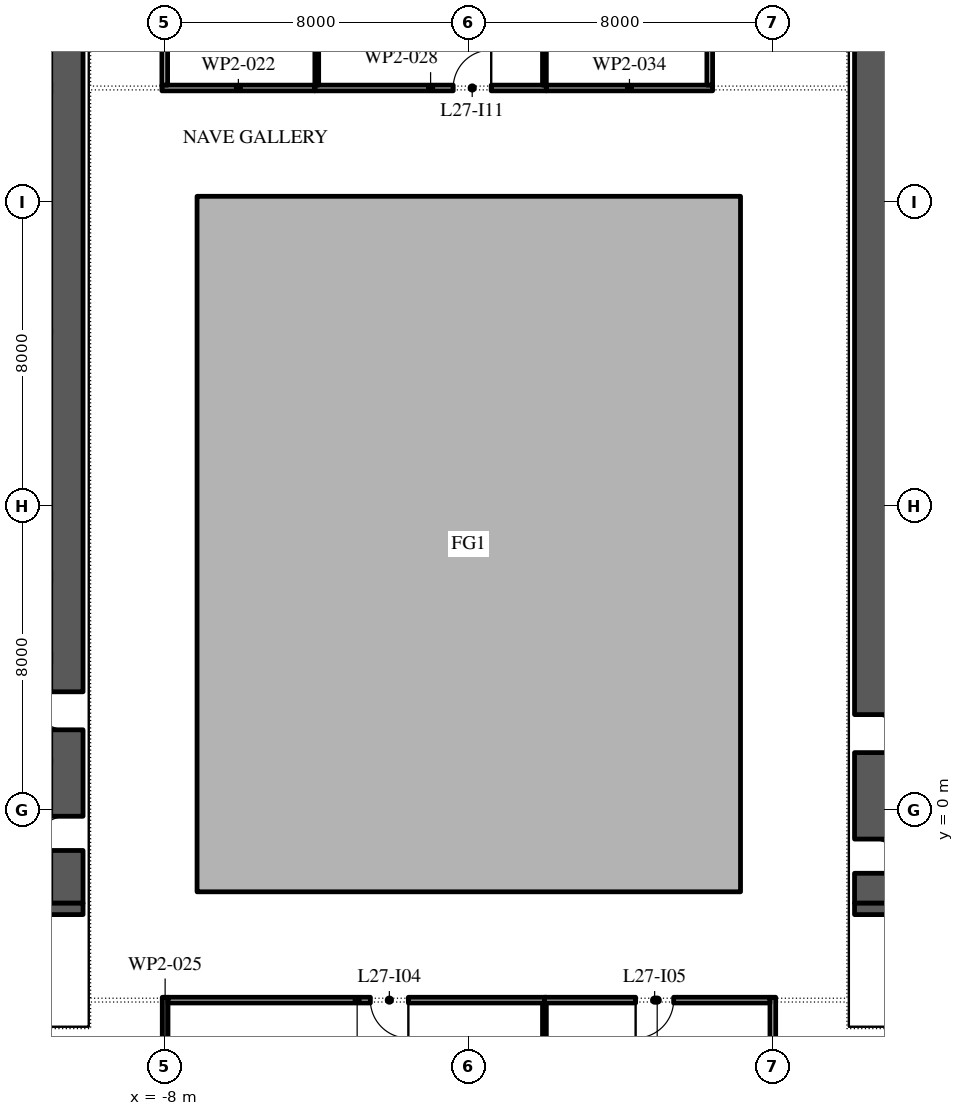
"""IFC4 building model, lengths in metres.
Left out: names, types, materials, properties, quantities, classifications, styles, units other than length and angle.
Written with IfcOpenShell. Run it as: python <this file> out.ifc"""

import sys

from ifc_helpers import new_model, si_unit, direction, frame, frame_2d, origin, place, context, subcontext, project, spatial, polyline, rectangle, outline, extrude, element, fill, save


model = new_model("IFC4")
c1 = context("Model", 3, precision=1e-05, world=origin(), true_north=direction((0.0, 1.0)))
c2 = subcontext(c1, "Body", "Model", "MODEL_VIEW")
j1 = project(units=[si_unit("LENGTHUNIT", "METRE"), si_unit("PLANEANGLEUNIT", "RADIAN")], contexts=[c1])
p1 = place(None, origin())
s1 = spatial("IfcSite", under=j1, at=p1, CompositionType="ELEMENT")
p2 = place(p1, origin())
s2 = spatial("IfcBuilding", under=s1, at=p2, CompositionType="ELEMENT")
p3 = place(p2, frame((0.0, 0.0, 126.6)))
s3 = spatial("IfcBuildingStorey", under=s2, at=p3, CompositionType="ELEMENT", Elevation=126.6)
p4 = place(p3, origin())
e1 = element("IfcWall", 1, at=p4, inside=s3, PredefinedType="STANDARD", context=c2, shape_type="SweptSolid", body=[
    extrude(outline(polyline([(-7.15, -2.15), (7.15, -2.15), (7.15, 16.15), (-7.15, 16.15), (-7.15, -2.15)]), holes=[polyline([(-7.0, -2.0), (-7.0, 16.0), (7.0, 16.0), (7.0, -2.0), (-7.0, -2.0)])]), origin(), (0.0, 0.0, 1.0), 4.0),
])
p5 = place(p3, frame((-10.575, -2.45, 0.0), z_axis=(0.0, 0.0, 1.0), x_axis=(0.0, 1.0, 0.0)))
e2 = element("IfcWall", 2, at=p5, inside=s3, PredefinedType="SHEAR", context=c2, shape_type="SweptSolid", body=[
    extrude(rectangle(XDim=27.9, YDim=0.85, at=frame_2d((13.95, 0.0))), origin(), (0.0, 0.0, 1.0), 4.0),
])
p6 = place(p5, frame((23.65, 0.0, 0.0)))
e3 = element("IfcOpeningElement", 3, at=p6, cuts=e2, PredefinedType="OPENING", context=c2, shape_type="SweptSolid", body=[
    extrude(rectangle(XDim=2.4, YDim=2.1, at=frame_2d((1.2, 1.05))), frame((0.0, 0.435, 0.0), z_axis=(0.0, -1.0, 0.0), x_axis=(1.0, 0.0, 0.0)), (0.0, 0.0, 1.0), 0.87),
])
p7 = place(p5, frame((1.387, 0.0, 0.0)))
e4 = element("IfcOpeningElement", 4, at=p7, cuts=e2, PredefinedType="OPENING", context=c2, shape_type="SweptSolid", body=[
    extrude(rectangle(XDim=0.9, YDim=2.1, at=frame_2d((0.45, 1.05))), frame((0.0, 0.435, 0.0), z_axis=(0.0, -1.0, 0.0), x_axis=(1.0, 0.0, 0.0)), (0.0, 0.0, 1.0), 0.87),
])
p8 = place(p5, frame((4.562, 0.0, 0.0)))
e5 = element("IfcOpeningElement", 5, at=p8, cuts=e2, PredefinedType="OPENING", context=c2, shape_type="SweptSolid", body=[
    extrude(rectangle(XDim=1.0, YDim=2.1, at=frame_2d((0.5, 1.05))), frame((0.0, 0.435, 0.0), z_axis=(0.0, -1.0, 0.0), x_axis=(1.0, 0.0, 0.0)), (0.0, 0.0, 1.0), 0.87),
])
p9 = place(p3, frame((-21.85, -2.6, 0.0), z_axis=(0.0, 0.0, 1.0), x_axis=(1.0, 0.0, 0.0)))
e6 = element("IfcWall", 6, at=p9, inside=s3, PredefinedType="SHEAR", context=c2, shape_type="SweptSolid", body=[
    extrude(rectangle(XDim=11.7, YDim=0.3, at=frame_2d((5.85, 0.0))), origin(), (0.0, 0.0, 1.0), 4.0),
])
p10 = place(p3, frame((10.575, -2.45, 0.0), z_axis=(0.0, 0.0, 1.0), x_axis=(0.0, 1.0, 0.0)))
e7 = element("IfcWall", 7, at=p10, inside=s3, PredefinedType="SHEAR", context=c2, shape_type="SweptSolid", body=[
    extrude(rectangle(XDim=27.9, YDim=0.85, at=frame_2d((13.95, 0.0))), origin(), (0.0, 0.0, 1.0), 4.0),
])
p11 = place(p10, frame((23.65, 0.0, 0.0)))
e8 = element("IfcOpeningElement", 8, at=p11, cuts=e7, PredefinedType="OPENING", context=c2, shape_type="SweptSolid", body=[
    extrude(rectangle(XDim=2.4, YDim=2.1, at=frame_2d((1.2, 1.05))), frame((0.0, 0.435, 0.0), z_axis=(0.0, -1.0, 0.0), x_axis=(1.0, 0.0, 0.0)), (0.0, 0.0, 1.0), 0.87),
])
p12 = place(p10, frame((0.788, 0.0, 0.0)))
e9 = element("IfcOpeningElement", 9, at=p12, cuts=e7, PredefinedType="OPENING", context=c2, shape_type="SweptSolid", body=[
    extrude(rectangle(XDim=0.9, YDim=2.1, at=frame_2d((0.45, 1.05))), frame((0.0, 0.435, 0.0), z_axis=(0.0, -1.0, 0.0), x_axis=(1.0, 0.0, 0.0)), (0.0, 0.0, 1.0), 0.87),
])
p13 = place(p10, frame((3.962, 0.0, 0.0)))
e10 = element("IfcOpeningElement", 10, at=p13, cuts=e7, PredefinedType="OPENING", context=c2, shape_type="SweptSolid", body=[
    extrude(rectangle(XDim=1.0, YDim=2.1, at=frame_2d((0.5, 1.05))), frame((0.0, 0.435, 0.0), z_axis=(0.0, -1.0, 0.0), x_axis=(1.0, 0.0, 0.0)), (0.0, 0.0, 1.0), 0.87),
])
p14 = place(p3, frame((10.15, -2.6, 0.0), z_axis=(0.0, 0.0, 1.0), x_axis=(1.0, 0.0, 0.0)))
e11 = element("IfcWall", 11, at=p14, inside=s3, PredefinedType="SHEAR", context=c2, shape_type="SweptSolid", body=[
    extrude(rectangle(XDim=11.7, YDim=0.3, at=frame_2d((5.85, 0.0))), origin(), (0.0, 0.0, 1.0), 4.0),
])
p15 = place(p3, frame((-8.075, 19.0, 0.0), z_axis=(0.0, 0.0, 1.0), x_axis=(1.0, 0.0, 0.0)))
e12 = element("IfcWall", 12, at=p15, inside=s3, PredefinedType="PARTITIONING", context=c2, shape_type="SweptSolid", body=[
    extrude(rectangle(XDim=4.025, YDim=0.15, at=frame_2d((2.012, 0.0))), origin(), (0.0, 0.0, 1.0), 4.0),
])
p16 = place(p3, frame((-8.0, 27.325, 0.0), z_axis=(0.0, 0.0, 1.0), x_axis=(0.0, -1.0, 0.0)))
e13 = element("IfcWall", 13, at=p16, inside=s3, PredefinedType="PARTITIONING", context=c2, shape_type="SweptSolid", body=[
    extrude(rectangle(XDim=8.25, YDim=0.15, at=frame_2d((4.125, 0.0))), origin(), (0.0, 0.0, 1.0), 4.0),
])
p17 = place(p16, frame((2.675, 0.0, 0.0)))
e14 = element("IfcOpeningElement", 14, at=p17, cuts=e13, PredefinedType="OPENING", context=c2, shape_type="SweptSolid", body=[
    extrude(rectangle(XDim=1.0, YDim=2.1, at=frame_2d((0.5, 1.05))), frame((0.0, 0.085, 0.0), z_axis=(0.0, -1.0, 0.0), x_axis=(1.0, 0.0, 0.0)), (0.0, 0.0, 1.0), 0.17),
])
p18 = place(p3, frame((-7.99, -4.925, 0.0), z_axis=(0.0, 0.0, 1.0), x_axis=(0.0, -1.0, 0.0)))
e15 = element("IfcWall", 15, at=p18, inside=s3, PredefinedType="PARTITIONING", context=c2, shape_type="SweptSolid", body=[
    extrude(rectangle(XDim=2.69, YDim=0.15, at=frame_2d((1.345, 0.0))), origin(), (0.0, 0.0, 1.0), 4.0),
])
p19 = place(p3, frame((-4.05, 19.0, 0.0), z_axis=(0.0, 0.0, 1.0), x_axis=(1.0, 0.0, 0.0)))
e16 = element("IfcWall", 16, at=p19, inside=s3, PredefinedType="PARTITIONING", context=c2, shape_type="SweptSolid", body=[
    extrude(rectangle(XDim=6.09, YDim=0.15, at=frame_2d((3.045, 0.0))), origin(), (0.0, 0.0, 1.0), 4.0),
])
p20 = place(p19, frame((3.64, 0.0, 0.0)))
e17 = element("IfcOpeningElement", 17, at=p20, cuts=e16, PredefinedType="OPENING", context=c2, shape_type="SweptSolid", body=[
    extrude(rectangle(XDim=1.0, YDim=2.1, at=frame_2d((0.5, 1.05))), frame((0.0, 0.085, 0.0), z_axis=(0.0, -1.0, 0.0), x_axis=(1.0, 0.0, 0.0)), (0.0, 0.0, 1.0), 0.17),
])
p21 = place(p3, frame((-4.0, 33.95, 0.0), z_axis=(0.0, 0.0, 1.0), x_axis=(0.0, -1.0, 0.0)))
e18 = element("IfcWall", 18, at=p21, inside=s3, PredefinedType="PARTITIONING", context=c2, shape_type="SweptSolid", body=[
    extrude(rectangle(XDim=14.875, YDim=0.1, at=frame_2d((7.438, 0.0))), origin(), (0.0, 0.0, 1.0), 4.0),
])
p22 = place(p3, frame((2.04, -5.0, 0.0), z_axis=(0.0, 0.0, 1.0), x_axis=(-1.0, 0.0, 0.0)))
e19 = element("IfcWall", 19, at=p22, inside=s3, PredefinedType="PARTITIONING", context=c2, shape_type="SweptSolid", body=[
    extrude(rectangle(XDim=9.955, YDim=0.15, at=frame_2d((4.978, 0.0))), origin(), (0.0, 0.0, 1.0), 4.0),
])
p23 = place(p22, frame((3.63, 0.0, 0.0)))
e20 = element("IfcOpeningElement", 20, at=p23, cuts=e19, PredefinedType="OPENING", context=c2, shape_type="SweptSolid", body=[
    extrude(rectangle(XDim=1.0, YDim=2.1, at=frame_2d((0.5, 1.05))), frame((0.0, 0.085, 0.0), z_axis=(0.0, -1.0, 0.0), x_axis=(1.0, 0.0, 0.0)), (0.0, 0.0, 1.0), 0.17),
])
p24 = place(p3, frame((1.99, -5.075, 0.0), z_axis=(0.0, 0.0, 1.0), x_axis=(0.0, -1.0, 0.0)))
e21 = element("IfcWall", 21, at=p24, inside=s3, PredefinedType="PARTITIONING", context=c2, shape_type="SweptSolid", body=[
    extrude(rectangle(XDim=12.215, YDim=0.1, at=frame_2d((6.107, 0.0))), origin(), (0.0, 0.0, 1.0), 4.0),
])
p25 = place(p3, frame((2.04, 19.0, 0.0), z_axis=(0.0, 0.0, 1.0), x_axis=(1.0, 0.0, 0.0)))
e22 = element("IfcWall", 22, at=p25, inside=s3, PredefinedType="PARTITIONING", context=c2, shape_type="SweptSolid", body=[
    extrude(rectangle(XDim=4.375, YDim=0.15, at=frame_2d((2.188, 0.0))), origin(), (0.0, 0.0, 1.0), 4.0),
])
p26 = place(p3, frame((1.99, 33.95, 0.0), z_axis=(0.0, 0.0, 1.0), x_axis=(0.0, -1.0, 0.0)))
e23 = element("IfcWall", 23, at=p26, inside=s3, PredefinedType="PARTITIONING", context=c2, shape_type="SweptSolid", body=[
    extrude(rectangle(XDim=14.875, YDim=0.1, at=frame_2d((7.438, 0.0))), origin(), (0.0, 0.0, 1.0), 4.0),
])
p27 = place(p3, frame((6.34, 19.075, 0.0), z_axis=(0.0, 0.0, 1.0), x_axis=(0.0, 1.0, 0.0)))
e24 = element("IfcWall", 24, at=p27, inside=s3, PredefinedType="PARTITIONING", context=c2, shape_type="SweptSolid", body=[
    extrude(rectangle(XDim=8.39, YDim=0.15, at=frame_2d((4.195, 0.0))), origin(), (0.0, 0.0, 1.0), 4.0),
])
p28 = place(p27, frame((3.665, 0.0, 0.0)))
e25 = element("IfcOpeningElement", 25, at=p28, cuts=e24, PredefinedType="OPENING", context=c2, shape_type="SweptSolid", body=[
    extrude(rectangle(XDim=1.0, YDim=2.1, at=frame_2d((0.5, 1.05))), frame((0.0, 0.085, 0.0), z_axis=(0.0, -1.0, 0.0), x_axis=(1.0, 0.0, 0.0)), (0.0, 0.0, 1.0), 0.17),
])
p29 = place(p3, frame((8.0, -7.775, 0.0), z_axis=(0.0, 0.0, 1.0), x_axis=(0.0, 1.0, 0.0)))
e26 = element("IfcWall", 26, at=p29, inside=s3, PredefinedType="PARTITIONING", context=c2, shape_type="SweptSolid", body=[
    extrude(rectangle(XDim=2.85, YDim=0.15, at=frame_2d((1.425, 0.0))), origin(), (0.0, 0.0, 1.0), 4.0),
])
p30 = place(p3, frame((7.925, -5.0, 0.0), z_axis=(0.0, 0.0, 1.0), x_axis=(-1.0, 0.0, 0.0)))
e27 = element("IfcWall", 27, at=p30, inside=s3, PredefinedType="PARTITIONING", context=c2, shape_type="SweptSolid", body=[
    extrude(rectangle(XDim=5.935, YDim=0.15, at=frame_2d((2.968, 0.0))), origin(), (0.0, 0.0, 1.0), 4.0),
])
p31 = place(p30, frame((2.535, 0.0, 0.0)))
e28 = element("IfcOpeningElement", 28, at=p31, cuts=e27, PredefinedType="OPENING", context=c2, shape_type="SweptSolid", body=[
    extrude(rectangle(XDim=1.0, YDim=2.1, at=frame_2d((0.5, 1.05))), frame((0.0, 0.085, 0.0), z_axis=(0.0, -1.0, 0.0), x_axis=(1.0, 0.0, 0.0)), (0.0, 0.0, 1.0), 0.17),
])
p32 = place(p7, origin())
e29 = element("IfcDoor", 29, at=p32, inside=s3, OperationType="SINGLE_SWING_RIGHT", PredefinedType="DOOR", context=c2, shape_type="SweptSolid", body=[
    extrude(rectangle(XDim=0.9, YDim=2.1, at=frame_2d((0.45, 1.05))), frame((0.0, 0.425, 0.0), z_axis=(0.0, -1.0, 0.0), x_axis=(1.0, 0.0, 0.0)), (0.0, 0.0, 1.0), 0.05),
])
fill(e4, e29)
p33 = place(p8, origin())
e30 = element("IfcDoor", 30, at=p33, inside=s3, OperationType="SINGLE_SWING_LEFT", PredefinedType="DOOR", context=c2, shape_type="SweptSolid", body=[
    extrude(rectangle(XDim=1.0, YDim=2.1, at=frame_2d((0.5, 1.05))), frame((0.0, 0.425, 0.0), z_axis=(0.0, -1.0, 0.0), x_axis=(1.0, 0.0, 0.0)), (0.0, 0.0, 1.0), 0.05),
])
fill(e5, e30)
p34 = place(p12, frame((0.9, -0.8, 0.0), z_axis=(0.0, 0.0, 1.0), x_axis=(-1.0, 0.0, 0.0)))
e31 = element("IfcDoor", 31, at=p34, inside=s3, OperationType="SINGLE_SWING_LEFT", PredefinedType="DOOR", context=c2, shape_type="SweptSolid", body=[
    extrude(rectangle(XDim=0.9, YDim=2.1, at=frame_2d((0.45, 1.05))), frame((0.0, -0.375, 0.0), z_axis=(0.0, -1.0, 0.0), x_axis=(1.0, 0.0, 0.0)), (0.0, 0.0, 1.0), 0.05),
])
fill(e9, e31)
p35 = place(p13, frame((1.0, -0.8, 0.0), z_axis=(0.0, 0.0, 1.0), x_axis=(-1.0, 0.0, 0.0)))
e32 = element("IfcDoor", 32, at=p35, inside=s3, OperationType="SINGLE_SWING_LEFT", PredefinedType="DOOR", context=c2, shape_type="SweptSolid", body=[
    extrude(rectangle(XDim=1.0, YDim=2.1, at=frame_2d((0.5, 1.05))), frame((0.0, -0.375, 0.0), z_axis=(0.0, -1.0, 0.0), x_axis=(1.0, 0.0, 0.0)), (0.0, 0.0, 1.0), 0.05),
])
fill(e10, e32)
p36 = place(p23, origin())
e33 = element("IfcDoor", 33, at=p36, inside=s3, OperationType="SINGLE_SWING_RIGHT", PredefinedType="DOOR", context=c2, shape_type="SweptSolid", body=[
    extrude(rectangle(XDim=1.0, YDim=2.1, at=frame_2d((0.5, 1.05))), frame((0.0, 0.025, 0.0), z_axis=(0.0, -1.0, 0.0), x_axis=(1.0, 0.0, 0.0)), (0.0, 0.0, 1.0), 0.05),
])
fill(e20, e33)
p37 = place(p31, origin())
e34 = element("IfcDoor", 34, at=p37, inside=s3, OperationType="SINGLE_SWING_LEFT", PredefinedType="DOOR", context=c2, shape_type="SweptSolid", body=[
    extrude(rectangle(XDim=1.0, YDim=2.1, at=frame_2d((0.5, 1.05))), frame((0.0, 0.025, 0.0), z_axis=(0.0, -1.0, 0.0), x_axis=(1.0, 0.0, 0.0)), (0.0, 0.0, 1.0), 0.05),
])
fill(e28, e34)
p38 = place(p20, origin())
e35 = element("IfcDoor", 35, at=p38, inside=s3, OperationType="SINGLE_SWING_LEFT", PredefinedType="DOOR", context=c2, shape_type="SweptSolid", body=[
    extrude(rectangle(XDim=1.0, YDim=2.1, at=frame_2d((0.5, 1.05))), frame((0.0, 0.025, 0.0), z_axis=(0.0, -1.0, 0.0), x_axis=(1.0, 0.0, 0.0)), (0.0, 0.0, 1.0), 0.05),
])
fill(e17, e35)
save(model, sys.argv[1])
